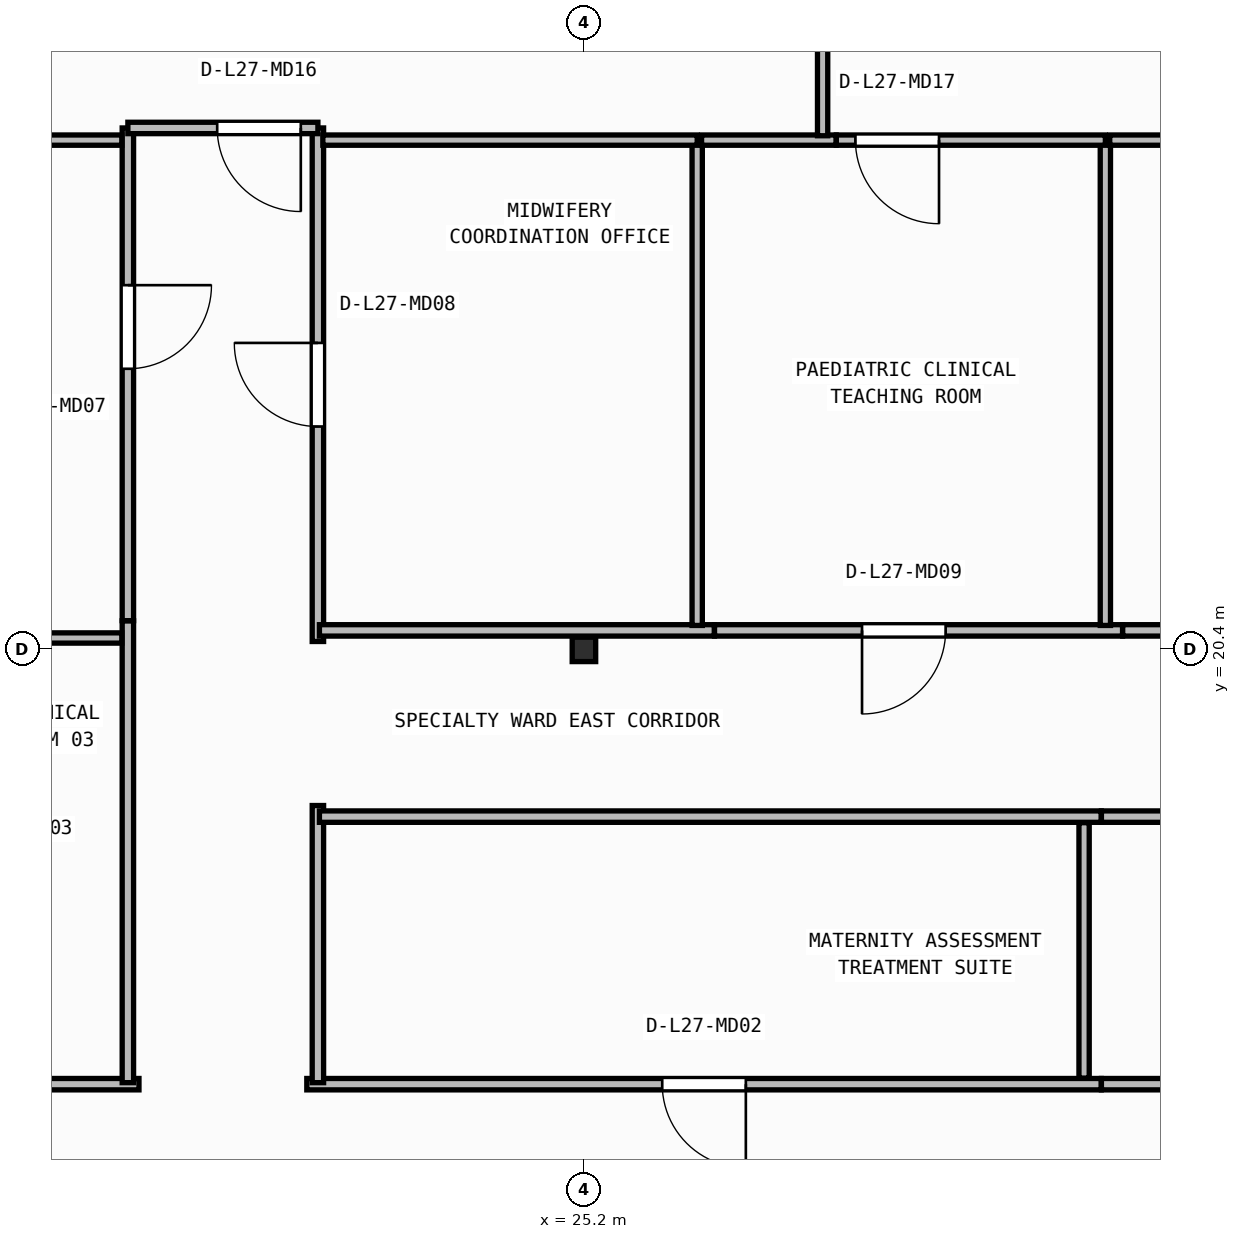
"""IFC4 building model, lengths in metres.
Left out: names, types, materials, properties, quantities, classifications, styles, units other than length and angle.
Written with IfcOpenShell. Run it as: python <this file> out.ifc"""

import sys

from ifc_helpers import new_model, si_unit, direction, frame, frame_2d, origin, origin_2d, place, context, subcontext, project, spatial, rectangle, i_section, extrude, element, fill, save


model = new_model("IFC4")
c1 = context("Model", 3, precision=1e-05, world=origin(), true_north=direction((0.0, 1.0)))
c2 = subcontext(c1, "Body", "Model", "MODEL_VIEW")
j1 = project(units=[si_unit("LENGTHUNIT", "METRE"), si_unit("PLANEANGLEUNIT", "RADIAN")], contexts=[c1])
p1 = place(None, origin())
s1 = spatial("IfcSite", under=j1, at=p1, CompositionType="ELEMENT")
p2 = place(p1, origin())
s2 = spatial("IfcBuilding", under=s1, at=p2, CompositionType="ELEMENT")
p3 = place(p2, frame((0.0, 0.0, 111.25)))
s3 = spatial("IfcBuildingStorey", under=s2, at=p3, CompositionType="ELEMENT", Elevation=111.25)
p4 = place(p3, frame((25.2, 20.4, 0.0), z_axis=(0.0, 0.0, 1.0), x_axis=(1.0, 0.0, 0.0)))
e1 = element("IfcColumn", 1, at=p4, inside=s3, PredefinedType="COLUMN", context=c2, shape_type="SweptSolid", body=[
    extrude(i_section(OverallWidth=0.309, OverallDepth=0.321, WebThickness=0.014, FlangeThickness=0.022, FilletRadius=0.017, at=origin_2d()), origin(), (0.0, 0.0, 1.0), 3.95),
])
p5 = place(p3, frame((19.346, 14.68, 0.0), z_axis=(0.0, 0.0, 1.0), x_axis=(-1.0, 0.0, 0.0)))
e2 = element("IfcWall", 2, at=p5, inside=s3, PredefinedType="PARTITIONING", context=c2, shape_type="SweptSolid", body=[
    extrude(rectangle(XDim=4.778, YDim=0.15, at=frame_2d((2.389, 0.0))), origin(), (0.0, 0.0, 1.0), 3.71),
])
p6 = place(p5, frame((1.839, 0.0, 0.0)))
e3 = element("IfcOpeningElement", 3, at=p6, cuts=e2, PredefinedType="OPENING", context=c2, shape_type="SweptSolid", body=[
    extrude(rectangle(XDim=1.1, YDim=2.1, at=frame_2d((0.55, 1.05))), frame((0.0, 0.085, 0.0), z_axis=(0.0, -1.0, 0.0), x_axis=(1.0, 0.0, 0.0)), (0.0, 0.0, 1.0), 0.17),
])
p7 = place(p3, frame((32.006, 14.68, 0.0), z_axis=(0.0, 0.0, 1.0), x_axis=(-1.0, 0.0, 0.0)))
e4 = element("IfcWall", 4, at=p7, inside=s3, PredefinedType="PARTITIONING", context=c2, shape_type="SweptSolid", body=[
    extrude(rectangle(XDim=10.452, YDim=0.15, at=frame_2d((5.226, 0.0))), origin(), (0.0, 0.0, 1.0), 3.71),
])
p8 = place(p7, frame((4.676, 0.0, 0.0)))
e5 = element("IfcOpeningElement", 5, at=p8, cuts=e4, PredefinedType="OPENING", context=c2, shape_type="SweptSolid", body=[
    extrude(rectangle(XDim=1.1, YDim=2.1, at=frame_2d((0.55, 1.05))), frame((0.0, 0.085, 0.0), z_axis=(0.0, -1.0, 0.0), x_axis=(1.0, 0.0, 0.0)), (0.0, 0.0, 1.0), 0.17),
])
p9 = place(p3, frame((43.726, 14.68, 0.0), z_axis=(0.0, 0.0, 1.0), x_axis=(-1.0, 0.0, 0.0)))
e6 = element("IfcWall", 6, at=p9, inside=s3, PredefinedType="PARTITIONING", context=c2, shape_type="SweptSolid", body=[
    extrude(rectangle(XDim=11.718, YDim=0.15, at=frame_2d((5.859, 0.0))), origin(), (0.0, 0.0, 1.0), 3.71),
])
p10 = place(p9, frame((5.309, 0.0, 0.0)))
e7 = element("IfcOpeningElement", 7, at=p10, cuts=e6, PredefinedType="OPENING", context=c2, shape_type="SweptSolid", body=[
    extrude(rectangle(XDim=1.1, YDim=2.1, at=frame_2d((0.55, 1.05))), frame((0.0, 0.085, 0.0), z_axis=(0.0, -1.0, 0.0), x_axis=(1.0, 0.0, 0.0)), (0.0, 0.0, 1.0), 0.17),
])
p11 = place(p3, frame((19.2, 20.776, 0.0), z_axis=(0.0, 0.0, 1.0), x_axis=(0.0, -1.0, 0.0)))
e8 = element("IfcWall", 8, at=p11, inside=s3, PredefinedType="PARTITIONING", context=c2, shape_type="SweptSolid", body=[
    extrude(rectangle(XDim=6.076, YDim=0.15, at=frame_2d((3.038, 0.0))), origin(), (0.0, 0.0, 1.0), 3.71),
])
p12 = place(p3, frame((21.7, 14.7, 0.0), z_axis=(0.0, 0.0, 1.0), x_axis=(0.0, 1.0, 0.0)))
e9 = element("IfcWall", 9, at=p12, inside=s3, PredefinedType="PARTITIONING", context=c2, shape_type="SweptSolid", body=[
    extrude(rectangle(XDim=3.646, YDim=0.15, at=frame_2d((1.823, 0.0))), origin(), (0.0, 0.0, 1.0), 3.71),
])
p13 = place(p3, frame((19.2, 27.26, 0.0), z_axis=(0.0, 0.0, 1.0), x_axis=(0.0, -1.0, 0.0)))
e10 = element("IfcWall", 10, at=p13, inside=s3, PredefinedType="PARTITIONING", context=c2, shape_type="SweptSolid", body=[
    extrude(rectangle(XDim=6.482, YDim=0.15, at=frame_2d((3.241, 0.0))), origin(), (0.0, 0.0, 1.0), 3.71),
])
p14 = place(p13, frame((2.068, 0.0, 0.0)))
e11 = element("IfcOpeningElement", 11, at=p14, cuts=e10, PredefinedType="OPENING", context=c2, shape_type="SweptSolid", body=[
    extrude(rectangle(XDim=1.1, YDim=2.1, at=frame_2d((0.55, 1.05))), frame((0.0, 0.085, 0.0), z_axis=(0.0, -1.0, 0.0), x_axis=(1.0, 0.0, 0.0)), (0.0, 0.0, 1.0), 0.17),
])
p15 = place(p3, frame((21.7, 20.504, 0.0), z_axis=(0.0, 0.0, 1.0), x_axis=(0.0, 1.0, 0.0)))
e12 = element("IfcWall", 12, at=p15, inside=s3, PredefinedType="PARTITIONING", context=c2, shape_type="SweptSolid", body=[
    extrude(rectangle(XDim=6.756, YDim=0.15, at=frame_2d((3.378, 0.0))), origin(), (0.0, 0.0, 1.0), 3.71),
])
p16 = place(p15, frame((2.828, 0.0, 0.0)))
e13 = element("IfcOpeningElement", 13, at=p16, cuts=e12, PredefinedType="OPENING", context=c2, shape_type="SweptSolid", body=[
    extrude(rectangle(XDim=1.1, YDim=2.1, at=frame_2d((0.55, 1.05))), frame((0.0, 0.085, 0.0), z_axis=(0.0, -1.0, 0.0), x_axis=(1.0, 0.0, 0.0)), (0.0, 0.0, 1.0), 0.17),
])
p17 = place(p3, frame((21.7, 27.26, 0.0), z_axis=(0.0, 0.0, 1.0), x_axis=(-1.0, 0.0, 0.0)))
e14 = element("IfcWall", 14, at=p17, inside=s3, PredefinedType="PARTITIONING", context=c2, shape_type="SweptSolid", body=[
    extrude(rectangle(XDim=2.5, YDim=0.15, at=frame_2d((1.25, 0.0))), origin(), (0.0, 0.0, 1.0), 3.71),
])
p18 = place(p17, frame((0.225, 0.0, 0.0)))
e15 = element("IfcOpeningElement", 15, at=p18, cuts=e14, PredefinedType="OPENING", context=c2, shape_type="SweptSolid", body=[
    extrude(rectangle(XDim=1.1, YDim=2.1, at=frame_2d((0.55, 1.05))), frame((0.0, 0.085, 0.0), z_axis=(0.0, -1.0, 0.0), x_axis=(1.0, 0.0, 0.0)), (0.0, 0.0, 1.0), 0.17),
])
p19 = place(p3, frame((21.72, 18.2, 0.0), z_axis=(0.0, 0.0, 1.0), x_axis=(1.0, 0.0, 0.0)))
e16 = element("IfcWall", 16, at=p19, inside=s3, PredefinedType="PARTITIONING", context=c2, shape_type="SweptSolid", body=[
    extrude(rectangle(XDim=10.286, YDim=0.15, at=frame_2d((5.143, 0.0))), origin(), (0.0, 0.0, 1.0), 3.71),
])
p20 = place(p3, frame((32.008, 18.2, 0.0), z_axis=(0.0, 0.0, 1.0), x_axis=(1.0, 0.0, 0.0)))
e17 = element("IfcWall", 17, at=p20, inside=s3, PredefinedType="PARTITIONING", context=c2, shape_type="SweptSolid", body=[
    extrude(rectangle(XDim=11.718, YDim=0.15, at=frame_2d((5.859, 0.0))), origin(), (0.0, 0.0, 1.0), 3.71),
])
p21 = place(p3, frame((26.916, 20.65, 0.0), z_axis=(0.0, 0.0, 1.0), x_axis=(-1.0, 0.0, 0.0)))
e18 = element("IfcWall", 18, at=p21, inside=s3, PredefinedType="PARTITIONING", context=c2, shape_type="SweptSolid", body=[
    extrude(rectangle(XDim=5.196, YDim=0.15, at=frame_2d((2.598, 0.0))), origin(), (0.0, 0.0, 1.0), 3.083),
])
p22 = place(p3, frame((32.286, 20.65, 0.0), z_axis=(0.0, 0.0, 1.0), x_axis=(-1.0, 0.0, 0.0)))
e19 = element("IfcWall", 19, at=p22, inside=s3, PredefinedType="PARTITIONING", context=c2, shape_type="SweptSolid", body=[
    extrude(rectangle(XDim=5.368, YDim=0.15, at=frame_2d((2.684, 0.0))), origin(), (0.0, 0.0, 1.0), 3.083),
])
p23 = place(p22, frame((2.327, 0.0, 0.0)))
e20 = element("IfcOpeningElement", 20, at=p23, cuts=e19, PredefinedType="OPENING", context=c2, shape_type="SweptSolid", body=[
    extrude(rectangle(XDim=1.1, YDim=2.1, at=frame_2d((0.55, 1.05))), frame((0.0, 0.085, 0.0), z_axis=(0.0, -1.0, 0.0), x_axis=(1.0, 0.0, 0.0)), (0.0, 0.0, 1.0), 0.17),
])
p24 = place(p3, frame((36.856, 20.65, 0.0), z_axis=(0.0, 0.0, 1.0), x_axis=(-1.0, 0.0, 0.0)))
e21 = element("IfcWall", 21, at=p24, inside=s3, PredefinedType="PARTITIONING", context=c2, shape_type="SweptSolid", body=[
    extrude(rectangle(XDim=4.568, YDim=0.15, at=frame_2d((2.284, 0.0))), origin(), (0.0, 0.0, 1.0), 3.083),
])
p25 = place(p24, frame((0.354, 0.0, 0.0)))
e22 = element("IfcOpeningElement", 22, at=p25, cuts=e21, PredefinedType="OPENING", context=c2, shape_type="SweptSolid", body=[
    extrude(rectangle(XDim=1.1, YDim=2.1, at=frame_2d((0.55, 1.05))), frame((0.0, 0.085, 0.0), z_axis=(0.0, -1.0, 0.0), x_axis=(1.0, 0.0, 0.0)), (0.0, 0.0, 1.0), 0.17),
])
p26 = place(p3, frame((19.12, 20.55, 0.0), z_axis=(0.0, 0.0, 1.0), x_axis=(-1.0, 0.0, 0.0)))
e23 = element("IfcWall", 23, at=p26, inside=s3, PredefinedType="PARTITIONING", context=c2, shape_type="SweptSolid", body=[
    extrude(rectangle(XDim=4.723, YDim=0.135, at=frame_2d((2.361, 0.0))), origin(), (0.0, 0.0, 1.0), 3.083),
])
p27 = place(p3, frame((31.78, 14.76, 0.0), z_axis=(0.0, 0.0, 1.0), x_axis=(0.0, 1.0, 0.0)))
e24 = element("IfcWall", 24, at=p27, inside=s3, PredefinedType="PARTITIONING", context=c2, shape_type="SweptSolid", body=[
    extrude(rectangle(XDim=3.36, YDim=0.135, at=frame_2d((1.68, 0.0))), origin(), (0.0, 0.0, 1.0), 3.71),
])
p28 = place(p3, frame((19.12, 27.1, 0.0), z_axis=(0.0, 0.0, 1.0), x_axis=(-1.0, 0.0, 0.0)))
e25 = element("IfcWall", 25, at=p28, inside=s3, PredefinedType="PARTITIONING", context=c2, shape_type="SweptSolid", body=[
    extrude(rectangle(XDim=6.03, YDim=0.135, at=frame_2d((3.015, 0.0))), origin(), (0.0, 0.0, 1.0), 3.71),
])
p29 = place(p3, frame((26.69, 20.715, 0.0), z_axis=(0.0, 0.0, 1.0), x_axis=(0.0, 1.0, 0.0)))
e26 = element("IfcWall", 26, at=p29, inside=s3, PredefinedType="PARTITIONING", context=c2, shape_type="SweptSolid", body=[
    extrude(rectangle(XDim=6.385, YDim=0.135, at=frame_2d((3.192, 0.0))), origin(), (0.0, 0.0, 1.0), 3.71),
])
p30 = place(p3, frame((26.69, 27.1, 0.0), z_axis=(0.0, 0.0, 1.0), x_axis=(-1.0, 0.0, 0.0)))
e27 = element("IfcWall", 27, at=p30, inside=s3, PredefinedType="PARTITIONING", context=c2, shape_type="SweptSolid", body=[
    extrude(rectangle(XDim=4.925, YDim=0.135, at=frame_2d((2.462, 0.0))), origin(), (0.0, 0.0, 1.0), 3.71),
])
p31 = place(p3, frame((32.06, 20.715, 0.0), z_axis=(0.0, 0.0, 1.0), x_axis=(0.0, 1.0, 0.0)))
e28 = element("IfcWall", 28, at=p31, inside=s3, PredefinedType="PARTITIONING", context=c2, shape_type="SweptSolid", body=[
    extrude(rectangle(XDim=6.385, YDim=0.135, at=frame_2d((3.192, 0.0))), origin(), (0.0, 0.0, 1.0), 3.71),
])
p32 = place(p3, frame((28.519, 27.1, 0.0), z_axis=(0.0, 0.0, 1.0), x_axis=(-1.0, 0.0, 0.0)))
e29 = element("IfcWall", 29, at=p32, inside=s3, PredefinedType="PARTITIONING", context=c2, shape_type="SweptSolid", body=[
    extrude(rectangle(XDim=1.771, YDim=0.135, at=frame_2d((0.885, 0.0))), origin(), (0.0, 0.0, 1.0), 3.71),
])
p33 = place(p3, frame((32.06, 27.1, 0.0), z_axis=(0.0, 0.0, 1.0), x_axis=(-1.0, 0.0, 0.0)))
e30 = element("IfcWall", 30, at=p33, inside=s3, PredefinedType="PARTITIONING", context=c2, shape_type="SweptSolid", body=[
    extrude(rectangle(XDim=3.54, YDim=0.135, at=frame_2d((1.77, 0.0))), origin(), (0.0, 0.0, 1.0), 3.71),
])
p34 = place(p33, frame((2.188, 0.0, 0.0)))
e31 = element("IfcOpeningElement", 31, at=p34, cuts=e30, PredefinedType="OPENING", context=c2, shape_type="SweptSolid", body=[
    extrude(rectangle(XDim=1.1, YDim=2.1, at=frame_2d((0.55, 1.05))), frame((0.0, 0.077, 0.0), z_axis=(0.0, -1.0, 0.0), x_axis=(1.0, 0.0, 0.0)), (0.0, 0.0, 1.0), 0.155),
])
p35 = place(p3, frame((36.63, 27.1, 0.0), z_axis=(0.0, 0.0, 1.0), x_axis=(-1.0, 0.0, 0.0)))
e32 = element("IfcWall", 32, at=p35, inside=s3, PredefinedType="PARTITIONING", context=c2, shape_type="SweptSolid", body=[
    extrude(rectangle(XDim=4.512, YDim=0.135, at=frame_2d((2.256, 0.0))), origin(), (0.0, 0.0, 1.0), 3.71),
])
p36 = place(p3, frame((28.34, 27.157, 0.0), z_axis=(0.0, 0.0, 1.0), x_axis=(0.0, 1.0, 0.0)))
e33 = element("IfcWall", 33, at=p36, inside=s3, PredefinedType="PARTITIONING", context=c2, shape_type="SweptSolid", body=[
    extrude(rectangle(XDim=4.355, YDim=0.135, at=frame_2d((2.178, 0.0))), origin(), (0.0, 0.0, 1.0), 3.71),
])
p37 = place(p8, origin())
e34 = element("IfcDoor", 34, at=p37, inside=s3, OperationType="SINGLE_SWING_LEFT", PredefinedType="DOOR", context=c2, shape_type="SweptSolid", body=[
    extrude(rectangle(XDim=1.1, YDim=2.1, at=frame_2d((0.55, 1.05))), frame((0.0, 0.025, 0.0), z_axis=(0.0, -1.0, 0.0), x_axis=(1.0, 0.0, 0.0)), (0.0, 0.0, 1.0), 0.05),
])
fill(e5, e34)
p38 = place(p14, origin())
e35 = element("IfcDoor", 35, at=p38, inside=s3, OperationType="SINGLE_SWING_LEFT", PredefinedType="DOOR", context=c2, shape_type="SweptSolid", body=[
    extrude(rectangle(XDim=1.1, YDim=2.1, at=frame_2d((0.55, 1.05))), frame((0.0, 0.025, 0.0), z_axis=(0.0, -1.0, 0.0), x_axis=(1.0, 0.0, 0.0)), (0.0, 0.0, 1.0), 0.05),
])
fill(e11, e35)
p39 = place(p16, origin())
e36 = element("IfcDoor", 36, at=p39, inside=s3, OperationType="SINGLE_SWING_RIGHT", PredefinedType="DOOR", context=c2, shape_type="SweptSolid", body=[
    extrude(rectangle(XDim=1.1, YDim=2.1, at=frame_2d((0.55, 1.05))), frame((0.0, 0.025, 0.0), z_axis=(0.0, -1.0, 0.0), x_axis=(1.0, 0.0, 0.0)), (0.0, 0.0, 1.0), 0.05),
])
fill(e13, e36)
p40 = place(p18, origin())
e37 = element("IfcDoor", 37, at=p40, inside=s3, OperationType="SINGLE_SWING_LEFT", PredefinedType="DOOR", context=c2, shape_type="SweptSolid", body=[
    extrude(rectangle(XDim=1.1, YDim=2.1, at=frame_2d((0.55, 1.05))), frame((0.0, 0.025, 0.0), z_axis=(0.0, -1.0, 0.0), x_axis=(1.0, 0.0, 0.0)), (0.0, 0.0, 1.0), 0.05),
])
fill(e15, e37)
p41 = place(p23, origin())
e38 = element("IfcDoor", 38, at=p41, inside=s3, OperationType="SINGLE_SWING_RIGHT", PredefinedType="DOOR", context=c2, shape_type="SweptSolid", body=[
    extrude(rectangle(XDim=1.1, YDim=2.1, at=frame_2d((0.55, 1.05))), frame((0.0, 0.025, 0.0), z_axis=(0.0, -1.0, 0.0), x_axis=(1.0, 0.0, 0.0)), (0.0, 0.0, 1.0), 0.05),
])
fill(e20, e38)
p42 = place(p34, origin())
e39 = element("IfcDoor", 39, at=p42, inside=s3, OperationType="SINGLE_SWING_LEFT", PredefinedType="DOOR", context=c2, shape_type="SweptSolid", body=[
    extrude(rectangle(XDim=1.1, YDim=2.1, at=frame_2d((0.55, 1.05))), frame((0.0, 0.025, 0.0), z_axis=(0.0, -1.0, 0.0), x_axis=(1.0, 0.0, 0.0)), (0.0, 0.0, 1.0), 0.05),
])
fill(e31, e39)
save(model, sys.argv[1])
